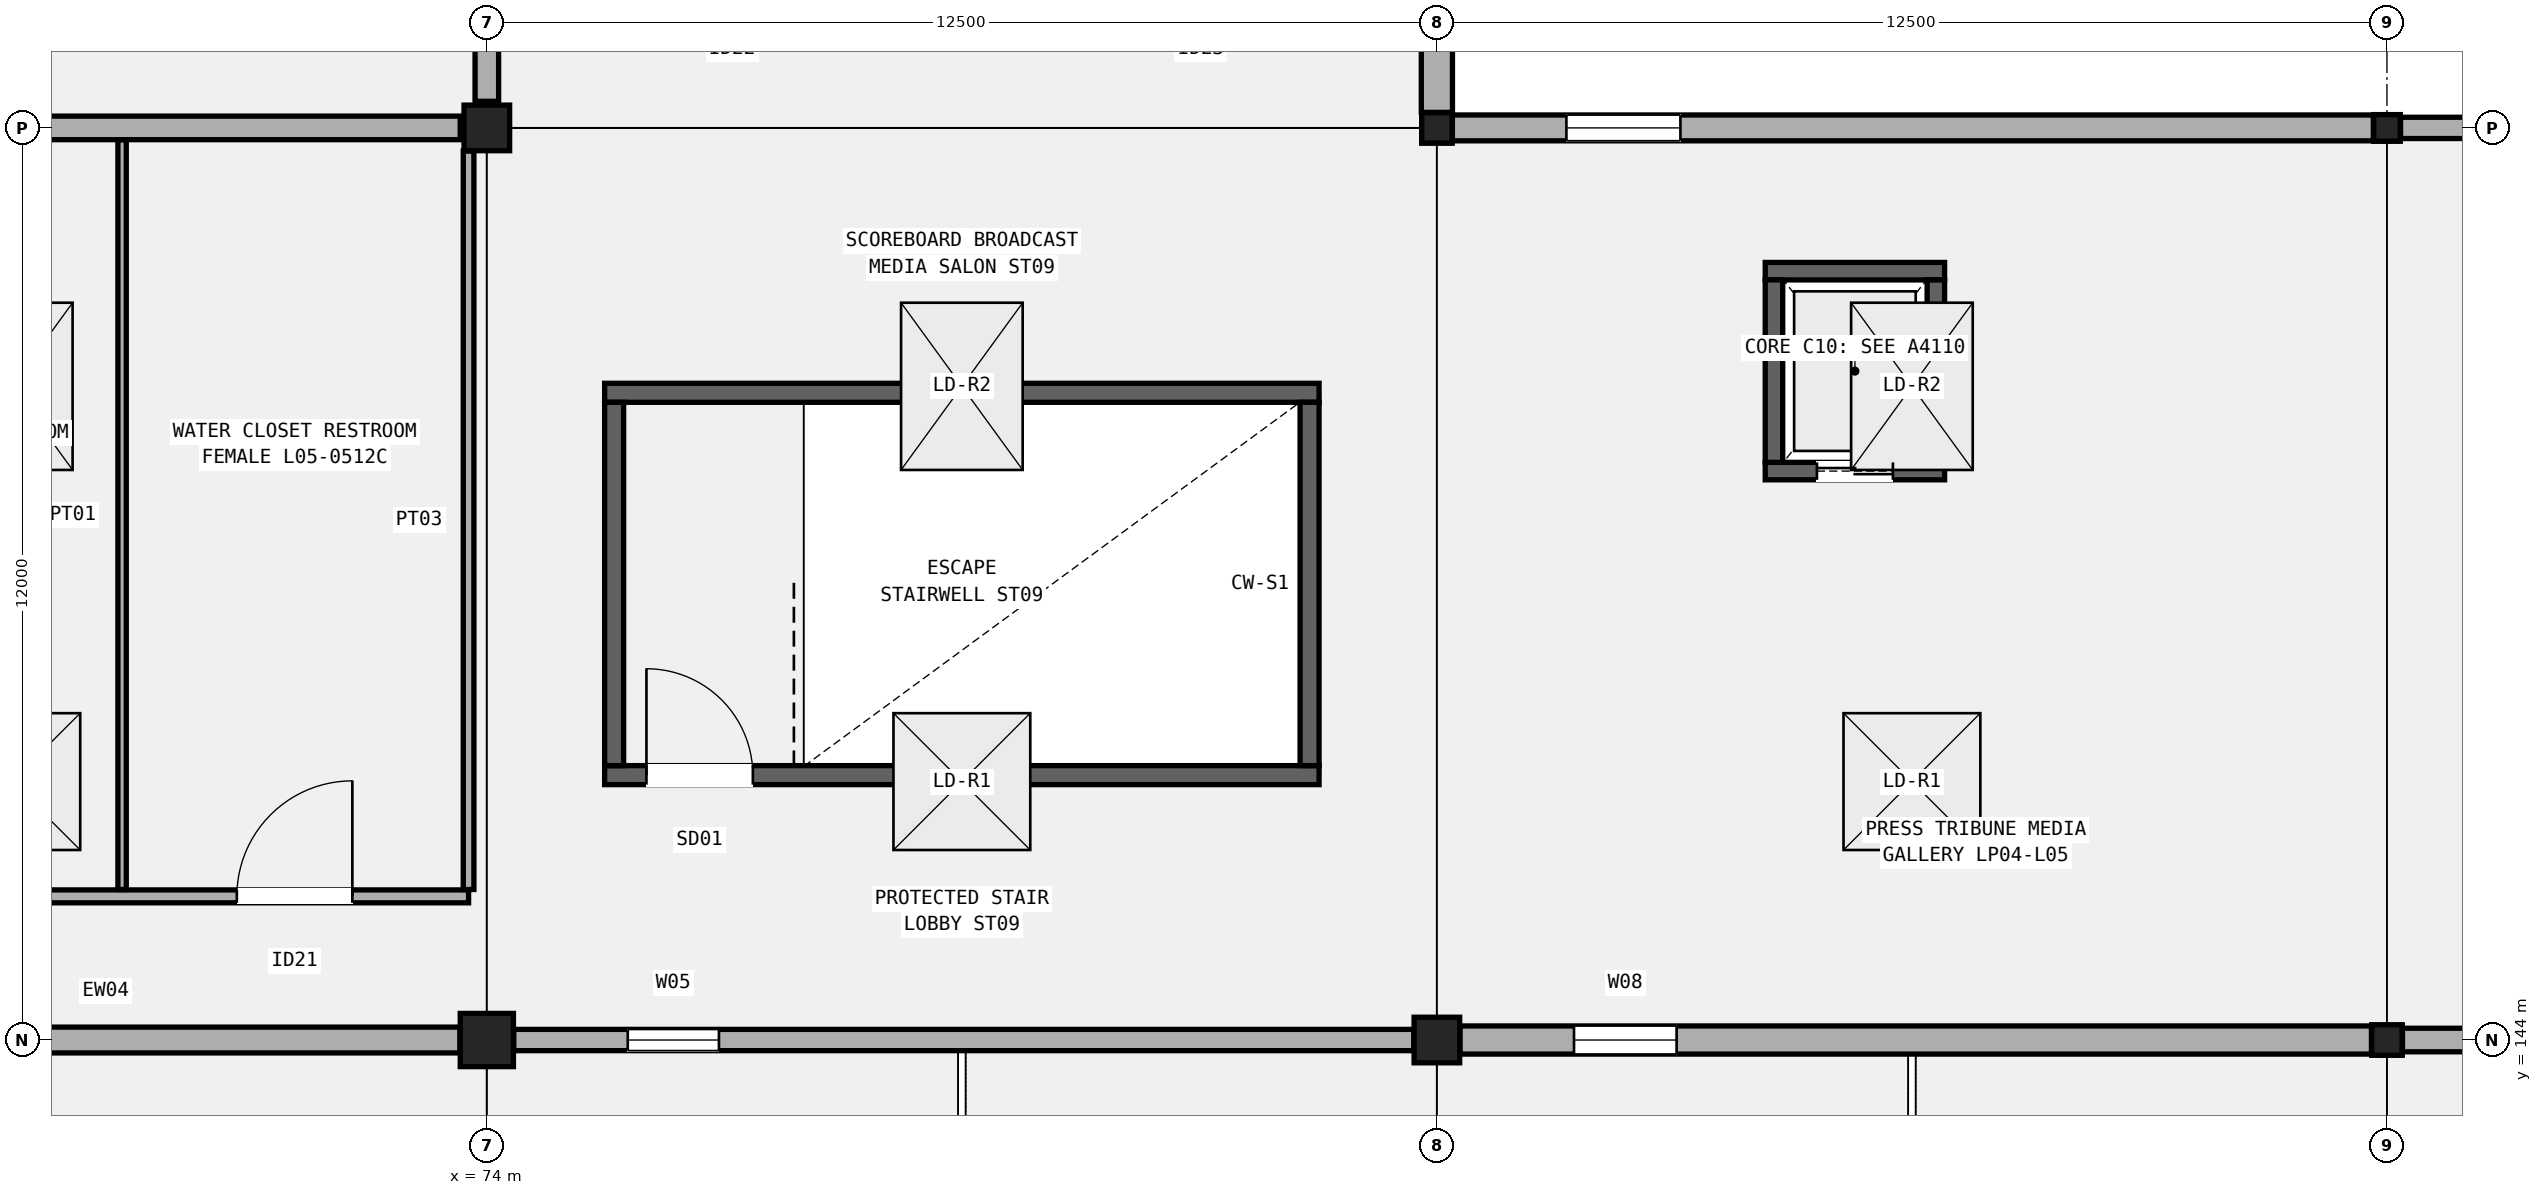
"""IFC4 building model, lengths in metres.
Left out: names, types, materials, properties, quantities, classifications, styles, units other than length and angle.
Written with IfcOpenShell. Run it as: python <this file> out.ifc"""

import sys

from ifc_helpers import new_model, si_unit, direction, frame, frame_2d, origin, origin_2d, place, context, subcontext, project, spatial, rectangle, hollow_rectangle, extrude, element, fill, save


model = new_model("IFC4")
c1 = context("Model", 3, precision=1e-05, world=origin(), true_north=direction((0.0, 1.0)))
c2 = subcontext(c1, "Body", "Model", "MODEL_VIEW")
j1 = project(units=[si_unit("LENGTHUNIT", "METRE"), si_unit("PLANEANGLEUNIT", "RADIAN")], contexts=[c1])
p1 = place(None, origin())
s1 = spatial("IfcSite", under=j1, at=p1, CompositionType="ELEMENT")
p2 = place(p1, origin())
s2 = spatial("IfcBuilding", under=s1, at=p2, CompositionType="ELEMENT")
p3 = place(p2, frame((0.0, 0.0, 25.8)))
s3 = spatial("IfcBuildingStorey", under=s2, at=p3, CompositionType="ELEMENT", Elevation=25.8)
p4 = place(p3, frame((74.0, 144.0, 0.0), z_axis=(0.0, 0.0, 1.0), x_axis=(1.0, 0.0, 0.0)))
e1 = element("IfcColumn", 1, at=p4, inside=s3, PredefinedType="COLUMN", context=c2, shape_type="SweptSolid", body=[
    extrude(rectangle(XDim=0.7, YDim=0.7, at=origin_2d()), origin(), (0.0, 0.0, 1.0), 5.4),
])
for number, where, z_axis, x_axis in (
    (2, (74.0, 156.0, 0.0), (0.0, 0.0, 1.0), (1.0, 0.0, 0.0)),
    (3, (86.5, 144.0, 0.0), (0.0, 0.0, 1.0), (1.0, 0.0, 0.0)),
):
    element("IfcColumn", number, at=place(p3, frame(where, z_axis=z_axis, x_axis=x_axis)), inside=s3, PredefinedType="COLUMN", context=c2, shape_type="SweptSolid", body=[
        extrude(rectangle(XDim=0.6, YDim=0.6, at=origin_2d()), origin(), (0.0, 0.0, 1.0), 5.4),
    ])
for number, where, z_axis, x_axis in (
    (4, (86.5, 156.0, 0.0), (0.0, 0.0, 1.0), (1.0, 0.0, 0.0)),
    (5, (99.0, 144.0, 0.0), (0.0, 0.0, 1.0), (1.0, 0.0, 0.0)),
):
    element("IfcColumn", number, at=place(p3, frame(where, z_axis=z_axis, x_axis=x_axis)), inside=s3, PredefinedType="COLUMN", context=c2, shape_type="SweptSolid", body=[
        extrude(hollow_rectangle(XDim=0.4, YDim=0.4, WallThickness=0.016, InnerFilletRadius=0.016, OuterFilletRadius=0.032, at=origin_2d()), origin(), (0.0, 0.0, 1.0), 5.4),
    ])
p5 = place(p3, frame((99.0, 156.0, 0.0), z_axis=(0.0, 0.0, 1.0), x_axis=(1.0, 0.0, 0.0)))
e6 = element("IfcColumn", 6, at=p5, inside=s3, PredefinedType="COLUMN", context=c2, shape_type="SweptSolid", body=[
    extrude(hollow_rectangle(XDim=0.35, YDim=0.35, WallThickness=0.016, InnerFilletRadius=0.016, OuterFilletRadius=0.032, at=origin_2d()), origin(), (0.0, 0.0, 1.0), 5.4),
])
p6 = place(p3, frame((61.629, 144.0, 0.0), z_axis=(0.0, 0.0, 1.0), x_axis=(1.0, 0.0, 0.0)))
e7 = element("IfcWall", 7, at=p6, inside=s3, PredefinedType="SOLIDWALL", context=c2, shape_type="SweptSolid", body=[
    extrude(rectangle(XDim=12.017, YDim=0.34, at=frame_2d((6.009, 0.0))), origin(), (0.0, 0.0, 1.0), 4.13),
])
p7 = place(p6, frame((1.5, 0.0, 0.95)))
e8 = element("IfcOpeningElement", 8, at=p7, cuts=e7, PredefinedType="OPENING", context=c2, shape_type="SweptSolid", body=[
    extrude(rectangle(XDim=0.9, YDim=2.7, at=frame_2d((0.45, 1.35))), frame((0.0, 0.18, 0.0), z_axis=(0.0, -1.0, 0.0), x_axis=(1.0, 0.0, 0.0)), (0.0, 0.0, 1.0), 0.36),
])
p8 = place(p3, frame((74.354, 144.0, 0.0), z_axis=(0.0, 0.0, 1.0), x_axis=(1.0, 0.0, 0.0)))
e9 = element("IfcWall", 9, at=p8, inside=s3, PredefinedType="SOLIDWALL", context=c2, shape_type="SweptSolid", body=[
    extrude(rectangle(XDim=11.842, YDim=0.28, at=frame_2d((5.921, 0.0))), origin(), (0.0, 0.0, 1.0), 4.13),
])
p9 = place(p8, frame((1.5, 0.0, 0.95)))
e10 = element("IfcOpeningElement", 10, at=p9, cuts=e9, PredefinedType="OPENING", context=c2, shape_type="SweptSolid", body=[
    extrude(rectangle(XDim=1.2, YDim=1.9, at=frame_2d((0.6, 0.95))), frame((0.0, 0.15, 0.0), z_axis=(0.0, -1.0, 0.0), x_axis=(1.0, 0.0, 0.0)), (0.0, 0.0, 1.0), 0.3),
])
p10 = place(p3, frame((86.5, 156.204, 0.0), z_axis=(0.0, 0.0, 1.0), x_axis=(0.0, 1.0, 0.0)))
e11 = element("IfcWall", 11, at=p10, inside=s3, PredefinedType="SOLIDWALL", context=c2, shape_type="SweptSolid", body=[
    extrude(rectangle(XDim=11.617, YDim=0.41, at=frame_2d((5.809, 0.0))), origin(), (0.0, 0.0, 1.0), 4.452),
])
p11 = place(p10, frame((2.316, 0.0, 0.95)))
e12 = element("IfcOpeningElement", 12, at=p11, cuts=e11, PredefinedType="OPENING", context=c2, shape_type="SweptSolid", body=[
    extrude(rectangle(XDim=1.35, YDim=2.0, at=frame_2d((0.675, 1.0))), frame((0.0, 0.215, 0.0), z_axis=(0.0, -1.0, 0.0), x_axis=(1.0, 0.0, 0.0)), (0.0, 0.0, 1.0), 0.43),
])
p12 = place(p3, frame((86.804, 144.0, 0.0), z_axis=(0.0, 0.0, 1.0), x_axis=(1.0, 0.0, 0.0)))
e13 = element("IfcWall", 13, at=p12, inside=s3, PredefinedType="SOLIDWALL", context=c2, shape_type="SweptSolid", body=[
    extrude(rectangle(XDim=11.992, YDim=0.37, at=frame_2d((5.996, 0.0))), origin(), (0.0, 0.0, 1.0), 4.13),
])
p13 = place(p12, frame((1.5, 0.0, 0.95)))
e14 = element("IfcOpeningElement", 14, at=p13, cuts=e13, PredefinedType="OPENING", context=c2, shape_type="SweptSolid", body=[
    extrude(rectangle(XDim=1.35, YDim=2.4, at=frame_2d((0.675, 1.2))), frame((0.0, 0.195, 0.0), z_axis=(0.0, -1.0, 0.0), x_axis=(1.0, 0.0, 0.0)), (0.0, 0.0, 1.0), 0.39),
])
p14 = place(p3, frame((86.704, 156.0, 0.0), z_axis=(0.0, 0.0, 1.0), x_axis=(1.0, 0.0, 0.0)))
e15 = element("IfcWall", 15, at=p14, inside=s3, PredefinedType="SOLIDWALL", context=c2, shape_type="SweptSolid", body=[
    extrude(rectangle(XDim=12.117, YDim=0.34, at=frame_2d((6.059, 0.0))), origin(), (0.0, 0.0, 1.0), 4.452),
])
p15 = place(p14, frame((1.5, 0.0, 0.95)))
e16 = element("IfcOpeningElement", 16, at=p15, cuts=e15, PredefinedType="OPENING", context=c2, shape_type="SweptSolid", body=[
    extrude(rectangle(XDim=1.5, YDim=1.8, at=frame_2d((0.75, 0.9))), frame((0.0, 0.18, 0.0), z_axis=(0.0, -1.0, 0.0), x_axis=(1.0, 0.0, 0.0)), (0.0, 0.0, 1.0), 0.36),
])
p16 = place(p3, frame((99.204, 144.0, 0.0), z_axis=(0.0, 0.0, 1.0), x_axis=(1.0, 0.0, 0.0)))
e17 = element("IfcWall", 17, at=p16, inside=s3, PredefinedType="SOLIDWALL", context=c2, shape_type="SweptSolid", body=[
    extrude(rectangle(XDim=12.617, YDim=0.31, at=frame_2d((6.309, 0.0))), origin(), (0.0, 0.0, 1.0), 4.13),
])
p17 = place(p16, frame((1.5, 0.0, 0.95)))
e18 = element("IfcOpeningElement", 18, at=p17, cuts=e17, PredefinedType="OPENING", context=c2, shape_type="SweptSolid", body=[
    extrude(rectangle(XDim=1.5, YDim=2.25, at=frame_2d((0.75, 1.125))), frame((0.0, 0.165, 0.0), z_axis=(0.0, -1.0, 0.0), x_axis=(1.0, 0.0, 0.0)), (0.0, 0.0, 1.0), 0.33),
])
p18 = place(p3, frame((99.179, 156.0, 0.0), z_axis=(0.0, 0.0, 1.0), x_axis=(1.0, 0.0, 0.0)))
e19 = element("IfcWall", 19, at=p18, inside=s3, PredefinedType="SOLIDWALL", context=c2, shape_type="SweptSolid", body=[
    extrude(rectangle(XDim=12.667, YDim=0.28, at=frame_2d((6.333, 0.0))), origin(), (0.0, 0.0, 1.0), 4.34),
])
p19 = place(p18, frame((1.5, 0.0, 0.95)))
e20 = element("IfcOpeningElement", 20, at=p19, cuts=e19, PredefinedType="OPENING", context=c2, shape_type="SweptSolid", body=[
    extrude(rectangle(XDim=1.65, YDim=2.05, at=frame_2d((0.825, 1.025))), frame((0.0, 0.15, 0.0), z_axis=(0.0, -1.0, 0.0), x_axis=(1.0, 0.0, 0.0)), (0.0, 0.0, 1.0), 0.3),
])
p20 = place(p3, frame((61.85, 156.0, 5.4), z_axis=(0.0, 0.0, 1.0), x_axis=(1.0, 0.0, 0.0)))
e21 = element("IfcWall", 21, at=p20, inside=s3, PredefinedType="SOLIDWALL", context=c2, shape_type="SweptSolid", body=[
    extrude(rectangle(XDim=11.8, YDim=0.31, at=frame_2d((5.9, 0.0))), origin(), (0.0, 0.0, 1.0), 0.88),
])
p21 = place(p3, frame((74.0, 156.35, 5.4), z_axis=(0.0, 0.0, 1.0), x_axis=(0.0, 1.0, 0.0)))
e22 = element("IfcWall", 22, at=p21, inside=s3, PredefinedType="SOLIDWALL", context=c2, shape_type="SweptSolid", body=[
    extrude(rectangle(XDim=11.3, YDim=0.31, at=frame_2d((5.65, 0.0))), origin(), (0.0, 0.0, 1.0), 0.48),
])
p22 = place(p3, frame((75.55, 147.485, 0.0), z_axis=(0.0, 0.0, 1.0), x_axis=(1.0, 0.0, 0.0)))
e23 = element("IfcWall", 23, at=p22, inside=s3, PredefinedType="SHEAR", context=c2, shape_type="SweptSolid", body=[
    extrude(rectangle(XDim=9.4, YDim=0.25, at=frame_2d((4.7, 0.0))), origin(), (0.0, 0.0, 1.0), 5.04),
])
p23 = place(p22, frame((0.55, 0.0, 0.0)))
e24 = element("IfcOpeningElement", 24, at=p23, cuts=e23, PredefinedType="OPENING", context=c2, shape_type="SweptSolid", body=[
    extrude(rectangle(XDim=1.4, YDim=2.15, at=frame_2d((0.7, 1.075))), frame((0.0, 0.135, 0.0), z_axis=(0.0, -1.0, 0.0), x_axis=(1.0, 0.0, 0.0)), (0.0, 0.0, 1.0), 0.27),
])
p24 = place(p3, frame((75.55, 152.515, 0.0), z_axis=(0.0, 0.0, 1.0), x_axis=(1.0, 0.0, 0.0)))
e25 = element("IfcWall", 25, at=p24, inside=s3, PredefinedType="SHEAR", context=c2, shape_type="SweptSolid", body=[
    extrude(rectangle(XDim=9.4, YDim=0.25, at=frame_2d((4.7, 0.0))), origin(), (0.0, 0.0, 1.0), 5.04),
])
for number, where, z_axis, x_axis in (
    (26, (75.675, 147.61, 0.0), (0.0, 0.0, 1.0), (0.0, 1.0, 0.0)),
    (27, (84.825, 147.61, 0.0), (0.0, 0.0, 1.0), (0.0, 1.0, 0.0)),
):
    element("IfcWall", number, at=place(p3, frame(where, z_axis=z_axis, x_axis=x_axis)), inside=s3, PredefinedType="SHEAR", context=c2, shape_type="SweptSolid", body=[
        extrude(rectangle(XDim=4.78, YDim=0.25, at=frame_2d((2.39, 0.0))), origin(), (0.0, 0.0, 1.0), 5.04),
    ])
p25 = place(p3, frame((90.82, 151.485, 0.0), z_axis=(0.0, 0.0, 1.0), x_axis=(1.0, 0.0, 0.0)))
e28 = element("IfcWall", 28, at=p25, inside=s3, PredefinedType="SHEAR", context=c2, shape_type="SweptSolid", body=[
    extrude(rectangle(XDim=2.36, YDim=0.23, at=frame_2d((1.18, 0.0))), origin(), (0.0, 0.0, 1.0), 5.04),
])
p26 = place(p25, frame((0.68, 0.0, 0.0)))
e29 = element("IfcOpeningElement", 29, at=p26, cuts=e28, PredefinedType="OPENING", context=c2, shape_type="SweptSolid", body=[
    extrude(rectangle(XDim=1.0, YDim=2.15, at=frame_2d((0.5, 1.075))), frame((0.0, 0.125, 0.0), z_axis=(0.0, -1.0, 0.0), x_axis=(1.0, 0.0, 0.0)), (0.0, 0.0, 1.0), 0.25),
])
p27 = place(p3, frame((90.82, 154.115, 0.0), z_axis=(0.0, 0.0, 1.0), x_axis=(1.0, 0.0, 0.0)))
e30 = element("IfcWall", 30, at=p27, inside=s3, PredefinedType="SHEAR", context=c2, shape_type="SweptSolid", body=[
    extrude(rectangle(XDim=2.36, YDim=0.23, at=frame_2d((1.18, 0.0))), origin(), (0.0, 0.0, 1.0), 5.04),
])
for number, where, z_axis, x_axis in (
    (31, (90.935, 151.6, 0.0), (0.0, 0.0, 1.0), (0.0, 1.0, 0.0)),
    (32, (93.065, 151.6, 0.0), (0.0, 0.0, 1.0), (0.0, 1.0, 0.0)),
):
    element("IfcWall", number, at=place(p3, frame(where, z_axis=z_axis, x_axis=x_axis)), inside=s3, PredefinedType="SHEAR", context=c2, shape_type="SweptSolid", body=[
        extrude(rectangle(XDim=2.4, YDim=0.23, at=frame_2d((1.2, 0.0))), origin(), (0.0, 0.0, 1.0), 5.04),
    ])
p28 = place(p3, frame((61.74, 145.89, 0.0), z_axis=(0.0, 0.0, 1.0), x_axis=(1.0, 0.0, 0.0)))
e33 = element("IfcWall", 33, at=p28, inside=s3, PredefinedType="PARTITIONING", context=c2, shape_type="SweptSolid", body=[
    extrude(rectangle(XDim=12.02, YDim=0.17, at=frame_2d((6.01, 0.0))), origin(), (0.0, 0.0, 1.0), 4.35),
])
p29 = place(p28, frame((0.711, 0.0, 0.0)))
e34 = element("IfcOpeningElement", 34, at=p29, cuts=e33, PredefinedType="OPENING", context=c2, shape_type="SweptSolid", body=[
    extrude(rectangle(XDim=1.44, YDim=2.26, at=frame_2d((0.72, 1.13))), frame((0.0, 0.095, 0.0), z_axis=(0.0, -1.0, 0.0), x_axis=(1.0, 0.0, 0.0)), (0.0, 0.0, 1.0), 0.19),
])
p30 = place(p28, frame((4.412, 0.0, 0.0)))
e35 = element("IfcOpeningElement", 35, at=p30, cuts=e33, PredefinedType="OPENING", context=c2, shape_type="SweptSolid", body=[
    extrude(rectangle(XDim=1.48, YDim=2.24, at=frame_2d((0.74, 1.12))), frame((0.0, 0.095, 0.0), z_axis=(0.0, -1.0, 0.0), x_axis=(1.0, 0.0, 0.0)), (0.0, 0.0, 1.0), 0.19),
])
p31 = place(p28, frame((8.971, 0.0, 0.0)))
e36 = element("IfcOpeningElement", 36, at=p31, cuts=e33, PredefinedType="OPENING", context=c2, shape_type="SweptSolid", body=[
    extrude(rectangle(XDim=1.52, YDim=2.28, at=frame_2d((0.76, 1.14))), frame((0.0, 0.095, 0.0), z_axis=(0.0, -1.0, 0.0), x_axis=(1.0, 0.0, 0.0)), (0.0, 0.0, 1.0), 0.19),
])
p32 = place(p3, frame((73.76, 145.98, 0.0), z_axis=(0.0, 0.0, 1.0), x_axis=(0.0, 1.0, 0.0)))
e37 = element("IfcWall", 37, at=p32, inside=s3, PredefinedType="PARTITIONING", context=c2, shape_type="SweptSolid", body=[
    extrude(rectangle(XDim=9.716, YDim=0.14, at=frame_2d((4.858, 0.0))), origin(), (0.0, 0.0, 1.0), 4.3),
])
p33 = place(p3, frame((69.201, 145.98, 0.0), z_axis=(0.0, 0.0, 1.0), x_axis=(0.0, 1.0, 0.0)))
e38 = element("IfcWall", 38, at=p33, inside=s3, PredefinedType="PARTITIONING", context=c2, shape_type="SweptSolid", body=[
    extrude(rectangle(XDim=9.863, YDim=0.11, at=frame_2d((4.932, 0.0))), origin(), (0.0, 0.0, 1.0), 4.35),
])
p34 = place(p9, origin())
e39 = element("IfcWindow", 39, at=p34, inside=s3, PartitioningType="SINGLE_PANEL", PredefinedType="WINDOW", context=c2, shape_type="SweptSolid", body=[
    extrude(rectangle(XDim=1.2, YDim=1.9, at=frame_2d((0.6, 0.95))), frame((0.0, 0.03, 0.0), z_axis=(0.0, -1.0, 0.0), x_axis=(1.0, 0.0, 0.0)), (0.0, 0.0, 1.0), 0.06),
])
fill(e10, e39)
p35 = place(p13, origin())
e40 = element("IfcWindow", 40, at=p35, inside=s3, PartitioningType="SINGLE_PANEL", PredefinedType="WINDOW", context=c2, shape_type="SweptSolid", body=[
    extrude(rectangle(XDim=1.35, YDim=2.4, at=frame_2d((0.675, 1.2))), frame((0.0, 0.03, 0.0), z_axis=(0.0, -1.0, 0.0), x_axis=(1.0, 0.0, 0.0)), (0.0, 0.0, 1.0), 0.06),
])
fill(e14, e40)
p36 = place(p15, origin())
e41 = element("IfcWindow", 41, at=p36, inside=s3, PartitioningType="SINGLE_PANEL", PredefinedType="WINDOW", context=c2, shape_type="SweptSolid", body=[
    extrude(rectangle(XDim=1.5, YDim=1.8, at=frame_2d((0.75, 0.9))), frame((0.0, 0.03, 0.0), z_axis=(0.0, -1.0, 0.0), x_axis=(1.0, 0.0, 0.0)), (0.0, 0.0, 1.0), 0.06),
])
fill(e16, e41)
p37 = place(p2, frame((0.0, 0.0, 31.2)))
p38 = place(p37, frame((0.0, 0.0, -0.36)))
p39 = place(p38, frame((67.75, 147.4, 0.0)))
p40 = place(p39, frame((0.0, 0.0, 0.31)))
e42 = element("IfcWindow", 42, at=p40, inside=s3, PartitioningType="SINGLE_PANEL", PredefinedType="LIGHTDOME", context=c2, shape_type="SweptSolid", body=[
    extrude(rectangle(XDim=1.8, YDim=1.8, at=origin_2d()), origin(), (0.0, 0.0, 1.0), 0.05),
])
p41 = place(p38, frame((67.75, 152.6, 0.0)))
p42 = place(p41, frame((0.0, 0.0, 0.31)))
e43 = element("IfcWindow", 43, at=p42, inside=s3, PartitioningType="SINGLE_PANEL", PredefinedType="LIGHTDOME", context=c2, shape_type="SweptSolid", body=[
    extrude(rectangle(XDim=2.2, YDim=1.6, at=origin_2d()), origin(), (0.0, 0.0, 1.0), 0.05),
])
p43 = place(p37, frame((0.0, 0.0, -0.36)))
p44 = place(p43, frame((80.25, 147.4, 0.0)))
p45 = place(p44, frame((0.0, 0.0, 0.31)))
e44 = element("IfcWindow", 44, at=p45, inside=s3, PartitioningType="SINGLE_PANEL", PredefinedType="LIGHTDOME", context=c2, shape_type="SweptSolid", body=[
    extrude(rectangle(XDim=1.8, YDim=1.8, at=origin_2d()), origin(), (0.0, 0.0, 1.0), 0.05),
])
p46 = place(p43, frame((80.25, 152.6, 0.0)))
p47 = place(p46, frame((0.0, 0.0, 0.31)))
e45 = element("IfcWindow", 45, at=p47, inside=s3, PartitioningType="SINGLE_PANEL", PredefinedType="LIGHTDOME", context=c2, shape_type="SweptSolid", body=[
    extrude(rectangle(XDim=2.2, YDim=1.6, at=origin_2d()), origin(), (0.0, 0.0, 1.0), 0.05),
])
p48 = place(p37, frame((0.0, 0.0, -0.36)))
p49 = place(p48, frame((92.75, 147.4, 0.0)))
p50 = place(p49, frame((0.0, 0.0, 0.31)))
e46 = element("IfcWindow", 46, at=p50, inside=s3, PartitioningType="SINGLE_PANEL", PredefinedType="LIGHTDOME", context=c2, shape_type="SweptSolid", body=[
    extrude(rectangle(XDim=1.8, YDim=1.8, at=origin_2d()), origin(), (0.0, 0.0, 1.0), 0.05),
])
p51 = place(p48, frame((92.75, 152.6, 0.0)))
p52 = place(p51, frame((0.0, 0.0, 0.31)))
e47 = element("IfcWindow", 47, at=p52, inside=s3, PartitioningType="SINGLE_PANEL", PredefinedType="LIGHTDOME", context=c2, shape_type="SweptSolid", body=[
    extrude(rectangle(XDim=2.2, YDim=1.6, at=origin_2d()), origin(), (0.0, 0.0, 1.0), 0.05),
])
p53 = place(p23, origin())
e48 = element("IfcDoor", 48, at=p53, inside=s3, OperationType="SINGLE_SWING_LEFT", PredefinedType="DOOR", context=c2, shape_type="SweptSolid", body=[
    extrude(rectangle(XDim=1.4, YDim=2.15, at=frame_2d((0.7, 1.075))), frame((0.0, 0.025, 0.0), z_axis=(0.0, -1.0, 0.0), x_axis=(1.0, 0.0, 0.0)), (0.0, 0.0, 1.0), 0.05),
])
fill(e24, e48)
p54 = place(p26, origin())
e49 = element("IfcDoor", 49, at=p54, inside=s3, OperationType="DOUBLE_DOOR_SLIDING", PredefinedType="DOOR", context=c2, shape_type="SweptSolid", body=[
    extrude(rectangle(XDim=1.0, YDim=2.15, at=frame_2d((0.5, 1.075))), frame((0.0, 0.025, 0.0), z_axis=(0.0, -1.0, 0.0), x_axis=(1.0, 0.0, 0.0)), (0.0, 0.0, 1.0), 0.05),
])
fill(e29, e49)
p55 = place(p31, origin())
e50 = element("IfcDoor", 50, at=p55, inside=s3, OperationType="SINGLE_SWING_RIGHT", PredefinedType="DOOR", context=c2, shape_type="SweptSolid", body=[
    extrude(rectangle(XDim=1.52, YDim=2.28, at=frame_2d((0.76, 1.14))), frame((0.0, 0.025, 0.0), z_axis=(0.0, -1.0, 0.0), x_axis=(1.0, 0.0, 0.0)), (0.0, 0.0, 1.0), 0.05),
])
fill(e36, e50)
save(model, sys.argv[1])
